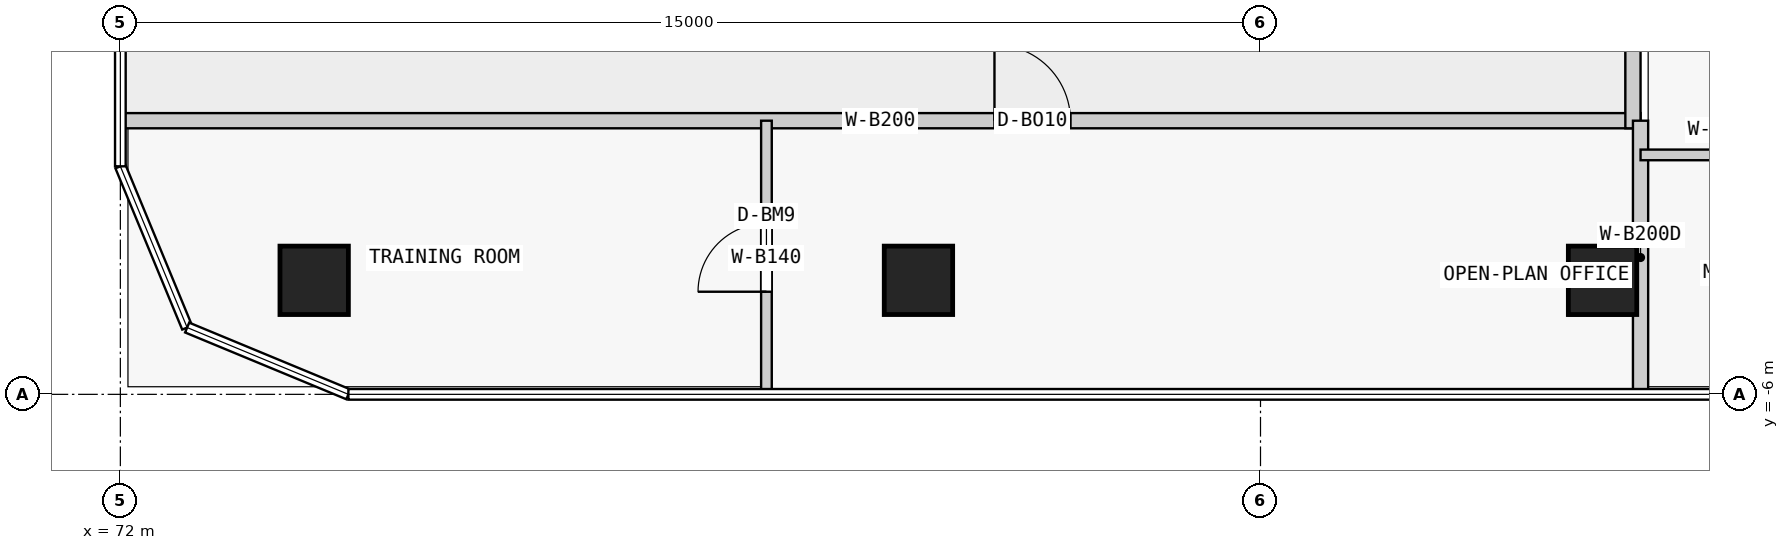
"""IFC4 building model, lengths in metres.
Left out: names, types, materials, properties, quantities, classifications, styles, units other than length and angle.
Written with IfcOpenShell. Run it as: python <this file> out.ifc"""

import sys

from ifc_helpers import new_model, si_unit, direction, frame, frame_2d, origin, origin_2d, place, context, subcontext, project, spatial, rectangle, extrude, element, fill, save


model = new_model("IFC4")
c1 = context("Model", 3, precision=1e-05, world=origin(), true_north=direction((0.0, 1.0)))
c2 = subcontext(c1, "Body", "Model", "MODEL_VIEW")
j1 = project(units=[si_unit("LENGTHUNIT", "METRE"), si_unit("PLANEANGLEUNIT", "RADIAN")], contexts=[c1])
p1 = place(None, origin())
s1 = spatial("IfcSite", under=j1, at=p1, CompositionType="ELEMENT")
p2 = place(p1, origin())
s2 = spatial("IfcBuilding", under=s1, at=p2, CompositionType="ELEMENT")
p3 = place(p2, frame((0.0, 0.0, 92.3)))
s3 = spatial("IfcBuildingStorey", under=s2, at=p3, CompositionType="ELEMENT", Elevation=92.3)
for number, where, z_axis, x_axis in (
    (1, (74.55, -4.5, 0.0), (0.0, 0.0, 1.0), (1.0, 0.0, 0.0)),
    (2, (82.5, -4.5, 0.0), (0.0, 0.0, 1.0), (1.0, 0.0, 0.0)),
    (3, (91.5, -4.5, 0.0), (0.0, 0.0, 1.0), (1.0, 0.0, 0.0)),
):
    element("IfcColumn", number, at=place(p3, frame(where, z_axis=z_axis, x_axis=x_axis)), inside=s3, PredefinedType="COLUMN", context=c2, shape_type="SweptSolid", body=[
        extrude(rectangle(XDim=0.9, YDim=0.9, at=origin_2d()), origin(), (0.0, 0.0, 1.0), 3.5),
    ])
p4 = place(p3, frame((72.0, -2.4, 0.0), z_axis=(0.0, 0.0, 1.0), x_axis=(1.0, 0.0, 0.0)))
e4 = element("IfcWall", 4, at=p4, inside=s3, PredefinedType="PARTITIONING", context=c2, shape_type="SweptSolid", body=[
    extrude(rectangle(XDim=20.0, YDim=0.2, at=frame_2d((10.0, 0.0))), origin(), (0.0, 0.0, 1.0), 3.25),
])
p5 = place(p4, frame((11.5, 0.0, 0.0)))
e5 = element("IfcOpeningElement", 5, at=p5, cuts=e4, PredefinedType="OPENING", context=c2, shape_type="SweptSolid", body=[
    extrude(rectangle(XDim=1.0, YDim=2.4, at=frame_2d((0.5, 1.2))), frame((0.0, 0.11, 0.0), z_axis=(0.0, -1.0, 0.0), x_axis=(1.0, 0.0, 0.0)), (0.0, 0.0, 1.0), 0.22),
])
p6 = place(p3, frame((91.9, -2.5, 0.0), z_axis=(0.0, 0.0, 1.0), x_axis=(0.0, 1.0, 0.0)))
e6 = element("IfcWall", 6, at=p6, inside=s3, PredefinedType="PARTITIONING", context=c2, shape_type="SweptSolid", body=[
    extrude(rectangle(XDim=12.1, YDim=0.2, at=frame_2d((6.05, 0.0))), origin(), (0.0, 0.0, 1.0), 3.25),
])
p7 = place(p6, frame((8.3, 0.0, 0.0)))
e7 = element("IfcOpeningElement", 7, at=p7, cuts=e6, PredefinedType="OPENING", context=c2, shape_type="SweptSolid", body=[
    extrude(rectangle(XDim=1.4, YDim=2.4, at=frame_2d((0.7, 1.2))), frame((0.0, 0.11, 0.0), z_axis=(0.0, -1.0, 0.0), x_axis=(1.0, 0.0, 0.0)), (0.0, 0.0, 1.0), 0.22),
])
p8 = place(p3, frame((92.0, -6.0, 0.0), z_axis=(0.0, 0.0, 1.0), x_axis=(0.0, 1.0, 0.0)))
e8 = element("IfcWall", 8, at=p8, inside=s3, PredefinedType="PARTITIONING", context=c2, shape_type="SweptSolid", body=[
    extrude(rectangle(XDim=3.6, YDim=0.2, at=frame_2d((1.8, 0.0))), origin(), (0.0, 0.0, 1.0), 3.25),
])
p9 = place(p3, frame((80.5, -6.0, 0.0), z_axis=(0.0, 0.0, 1.0), x_axis=(0.0, 1.0, 0.0)))
e9 = element("IfcWall", 9, at=p9, inside=s3, PredefinedType="PARTITIONING", context=c2, shape_type="SweptSolid", body=[
    extrude(rectangle(XDim=3.6, YDim=0.14, at=frame_2d((1.8, 0.0))), origin(), (0.0, 0.0, 1.0), 3.25),
])
p10 = place(p9, frame((1.35, 0.0, 0.0)))
e10 = element("IfcOpeningElement", 10, at=p10, cuts=e9, PredefinedType="OPENING", context=c2, shape_type="SweptSolid", body=[
    extrude(rectangle(XDim=0.9, YDim=2.4, at=frame_2d((0.45, 1.2))), frame((0.0, 0.08, 0.0), z_axis=(0.0, -1.0, 0.0), x_axis=(1.0, 0.0, 0.0)), (0.0, 0.0, 1.0), 0.16),
])
p11 = place(p3, frame((92.0, -2.85, 0.0), z_axis=(0.0, 0.0, 1.0), x_axis=(1.0, 0.0, 0.0)))
e11 = element("IfcWall", 11, at=p11, inside=s3, PredefinedType="PARTITIONING", context=c2, shape_type="SweptSolid", body=[
    extrude(rectangle(XDim=3.38, YDim=0.14, at=frame_2d((1.69, 0.0))), origin(), (0.0, 0.0, 1.0), 3.25),
])
p12 = place(p5, origin())
e12 = element("IfcDoor", 12, at=p12, inside=s3, OperationType="SINGLE_SWING_LEFT", PredefinedType="DOOR", context=c2, shape_type="SweptSolid", body=[
    extrude(rectangle(XDim=1.0, YDim=2.4, at=frame_2d((0.5, 1.2))), frame((0.0, 0.025, 0.0), z_axis=(0.0, -1.0, 0.0), x_axis=(1.0, 0.0, 0.0)), (0.0, 0.0, 1.0), 0.05),
])
fill(e5, e12)
p13 = place(p10, origin())
e13 = element("IfcDoor", 13, at=p13, inside=s3, OperationType="SINGLE_SWING_LEFT", PredefinedType="DOOR", context=c2, shape_type="SweptSolid", body=[
    extrude(rectangle(XDim=0.9, YDim=2.4, at=frame_2d((0.45, 1.2))), frame((0.0, 0.025, 0.0), z_axis=(0.0, -1.0, 0.0), x_axis=(1.0, 0.0, 0.0)), (0.0, 0.0, 1.0), 0.05),
])
fill(e10, e13)
save(model, sys.argv[1])
